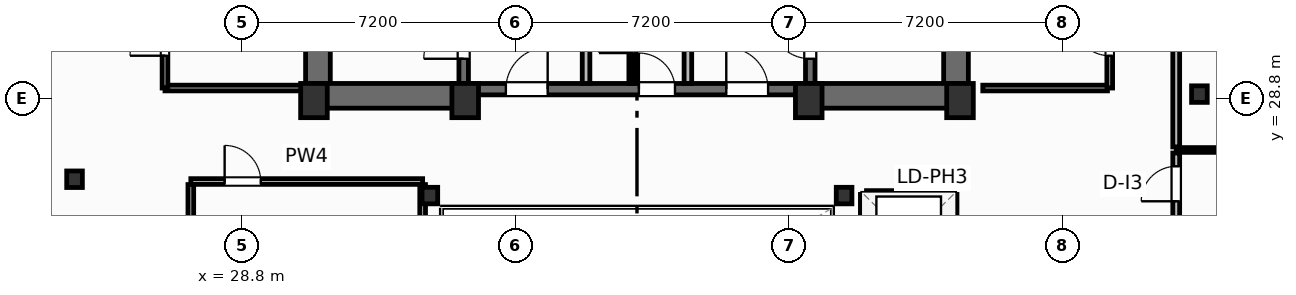
"""IFC4 building model, lengths in metres.
Left out: names, types, materials, properties, quantities, classifications, styles, units other than length and angle.
Written with IfcOpenShell. Run it as: python <this file> out.ifc"""

import sys

from ifc_helpers import new_model, si_unit, direction, frame, frame_2d, origin, origin_2d, place, context, subcontext, project, spatial, rectangle, i_section, extrude, element, fill, save


model = new_model("IFC4")
c1 = context("Model", 3, precision=1e-05, world=origin(), true_north=direction((0.0, 1.0)))
c2 = subcontext(c1, "Body", "Model", "MODEL_VIEW")
j1 = project(units=[si_unit("LENGTHUNIT", "METRE"), si_unit("PLANEANGLEUNIT", "RADIAN")], contexts=[c1])
p1 = place(None, origin())
s1 = spatial("IfcSite", under=j1, at=p1, CompositionType="ELEMENT")
p2 = place(p1, origin())
s2 = spatial("IfcBuilding", under=s1, at=p2, CompositionType="ELEMENT")
p3 = place(p2, frame((0.0, 0.0, 249.7)))
s3 = spatial("IfcBuildingStorey", under=s2, at=p3, CompositionType="ELEMENT", Elevation=249.7)
for number, where, z_axis, x_axis in (
    (1, (30.7, 28.75, 0.0), (0.0, 0.0, 1.0), (1.0, 0.0, 0.0)),
    (2, (34.68, 28.75, 0.0), (0.0, 0.0, 1.0), (1.0, 0.0, 0.0)),
    (3, (43.72, 28.75, 0.0), (0.0, 0.0, 1.0), (1.0, 0.0, 0.0)),
    (4, (47.7, 28.75, 0.0), (0.0, 0.0, 1.0), (1.0, 0.0, 0.0)),
):
    element("IfcColumn", number, at=place(p3, frame(where, z_axis=z_axis, x_axis=x_axis)), inside=s3, PredefinedType="COLUMN", context=c2, shape_type="SweptSolid", body=[
        extrude(rectangle(XDim=0.7, YDim=0.9, at=origin_2d()), origin(), (0.0, 0.0, 1.0), 3.7),
    ])
for number, where, z_axis, x_axis in (
    (5, (33.75, 26.25, 0.0), (0.0, 0.0, 1.0), (1.0, 0.0, 0.0)),
    (6, (44.65, 26.25, 0.0), (0.0, 0.0, 1.0), (1.0, 0.0, 0.0)),
    (7, (24.4, 26.68, 0.0), (0.0, 0.0, 1.0), (1.0, 0.0, 0.0)),
    (8, (54.0, 28.92, 0.0), (0.0, 0.0, 1.0), (1.0, 0.0, 0.0)),
):
    element("IfcColumn", number, at=place(p3, frame(where, z_axis=z_axis, x_axis=x_axis)), inside=s3, PredefinedType="COLUMN", context=c2, shape_type="SweptSolid", body=[
        extrude(i_section(OverallWidth=0.412, OverallDepth=0.435, WebThickness=0.036, FlangeThickness=0.057, FilletRadius=0.025, at=origin_2d()), origin(), (0.0, 0.0, 1.0), 3.7),
    ])
for number, where, z_axis, x_axis in (
    (9, (30.805, 29.2, 0.0), (0.0, 0.0, 1.0), (0.0, 1.0, 0.0)),
    (10, (47.595, 29.2, 0.0), (0.0, 0.0, 1.0), (0.0, 1.0, 0.0)),
):
    element("IfcWall", number, at=place(p3, frame(where, z_axis=z_axis, x_axis=x_axis)), inside=s3, PredefinedType="SHEAR", context=c2, shape_type="SweptSolid", body=[
        extrude(rectangle(XDim=9.22, YDim=0.65, at=frame_2d((4.61, 0.0))), origin(), (0.0, 0.0, 1.0), 3.38),
    ])
p4 = place(p3, frame((30.48, 28.875, 0.0), z_axis=(0.0, 0.0, 1.0), x_axis=(1.0, 0.0, 0.0)))
e11 = element("IfcWall", 11, at=p4, inside=s3, PredefinedType="SHEAR", context=c2, shape_type="SweptSolid", body=[
    extrude(rectangle(XDim=4.32, YDim=0.65, at=frame_2d((2.16, 0.0))), origin(), (0.0, 0.0, 1.0), 3.38),
])
p5 = place(p3, frame((43.6, 28.875, 0.0), z_axis=(0.0, 0.0, 1.0), x_axis=(1.0, 0.0, 0.0)))
e12 = element("IfcWall", 12, at=p5, inside=s3, PredefinedType="SHEAR", context=c2, shape_type="SweptSolid", body=[
    extrude(rectangle(XDim=4.32, YDim=0.65, at=frame_2d((2.16, 0.0))), origin(), (0.0, 0.0, 1.0), 3.38),
])
p6 = place(p3, frame((34.8, 29.05, 0.0), z_axis=(0.0, 0.0, 1.0), x_axis=(1.0, 0.0, 0.0)))
e13 = element("IfcWall", 13, at=p6, inside=s3, PredefinedType="SHEAR", context=c2, shape_type="SweptSolid", body=[
    extrude(rectangle(XDim=8.8, YDim=0.3, at=frame_2d((4.4, 0.0))), origin(), (0.0, 0.0, 1.0), 3.38),
])
p7 = place(p6, frame((0.95, 0.0, 0.0)))
e14 = element("IfcOpeningElement", 14, at=p7, cuts=e13, PredefinedType="OPENING", context=c2, shape_type="SweptSolid", body=[
    extrude(rectangle(XDim=1.1, YDim=2.15, at=frame_2d((0.55, 1.075))), frame((0.0, 0.16, 0.0), z_axis=(0.0, -1.0, 0.0), x_axis=(1.0, 0.0, 0.0)), (0.0, 0.0, 1.0), 0.32),
])
p8 = place(p6, frame((6.75, 0.0, 0.0)))
e15 = element("IfcOpeningElement", 15, at=p8, cuts=e13, PredefinedType="OPENING", context=c2, shape_type="SweptSolid", body=[
    extrude(rectangle(XDim=1.1, YDim=2.15, at=frame_2d((0.55, 1.075))), frame((0.0, 0.16, 0.0), z_axis=(0.0, -1.0, 0.0), x_axis=(1.0, 0.0, 0.0)), (0.0, 0.0, 1.0), 0.32),
])
p9 = place(p6, frame((4.45, 0.0, 0.0)))
e16 = element("IfcOpeningElement", 16, at=p9, cuts=e13, PredefinedType="OPENING", context=c2, shape_type="SweptSolid", body=[
    extrude(rectangle(XDim=0.95, YDim=2.15, at=frame_2d((0.475, 1.075))), frame((0.0, 0.16, 0.0), z_axis=(0.0, -1.0, 0.0), x_axis=(1.0, 0.0, 0.0)), (0.0, 0.0, 1.0), 0.32),
])
p10 = place(p3, frame((34.64, 29.2, 0.0), z_axis=(0.0, 0.0, 1.0), x_axis=(0.0, 1.0, 0.0)))
e17 = element("IfcWall", 17, at=p10, inside=s3, PredefinedType="SHEAR", context=c2, shape_type="SweptSolid", body=[
    extrude(rectangle(XDim=9.22, YDim=0.25, at=frame_2d((4.61, 0.0))), origin(), (0.0, 0.0, 1.0), 3.38),
])
p11 = place(p10, frame((0.65, 0.0, 0.0)))
e18 = element("IfcOpeningElement", 18, at=p11, cuts=e17, PredefinedType="OPENING", context=c2, shape_type="SweptSolid", body=[
    extrude(rectangle(XDim=1.05, YDim=2.15, at=frame_2d((0.525, 1.075))), frame((0.0, 0.135, 0.0), z_axis=(0.0, -1.0, 0.0), x_axis=(1.0, 0.0, 0.0)), (0.0, 0.0, 1.0), 0.27),
])
p12 = place(p3, frame((43.76, 29.2, 0.0), z_axis=(0.0, 0.0, 1.0), x_axis=(0.0, 1.0, 0.0)))
e19 = element("IfcWall", 19, at=p12, inside=s3, PredefinedType="SHEAR", context=c2, shape_type="SweptSolid", body=[
    extrude(rectangle(XDim=9.22, YDim=0.25, at=frame_2d((4.61, 0.0))), origin(), (0.0, 0.0, 1.0), 3.38),
])
p13 = place(p12, frame((0.65, 0.0, 0.0)))
e20 = element("IfcOpeningElement", 20, at=p13, cuts=e19, PredefinedType="OPENING", context=c2, shape_type="SweptSolid", body=[
    extrude(rectangle(XDim=1.05, YDim=2.15, at=frame_2d((0.525, 1.075))), frame((0.0, 0.135, 0.0), z_axis=(0.0, -1.0, 0.0), x_axis=(1.0, 0.0, 0.0)), (0.0, 0.0, 1.0), 0.27),
])
p14 = place(p3, frame((53.39, 19.3, 0.0), z_axis=(0.0, 0.0, 1.0), x_axis=(0.0, 1.0, 0.0)))
e21 = element("IfcWall", 21, at=p14, inside=s3, PredefinedType="PARTITIONING", context=c2, shape_type="SweptSolid", body=[
    extrude(rectangle(XDim=8.07, YDim=0.18, at=frame_2d((4.035, 0.0))), origin(), (0.0, 0.0, 1.0), 3.38),
])
p15 = place(p14, frame((6.8, 0.0, 0.0)))
e22 = element("IfcOpeningElement", 22, at=p15, cuts=e21, PredefinedType="OPENING", context=c2, shape_type="SweptSolid", body=[
    extrude(rectangle(XDim=0.92, YDim=2.05, at=frame_2d((0.46, 1.025))), frame((0.0, 0.1, 0.0), z_axis=(0.0, -1.0, 0.0), x_axis=(1.0, 0.0, 0.0)), (0.0, 0.0, 1.0), 0.2),
])
p16 = place(p3, frame((53.39, 27.53, 0.0), z_axis=(0.0, 0.0, 1.0), x_axis=(0.0, 1.0, 0.0)))
e23 = element("IfcWall", 23, at=p16, inside=s3, PredefinedType="PARTITIONING", context=c2, shape_type="SweptSolid", body=[
    extrude(rectangle(XDim=11.67, YDim=0.18, at=frame_2d((5.835, 0.0))), origin(), (0.0, 0.0, 1.0), 3.38),
])
p17 = place(p16, frame((5.8, 0.0, 0.0)))
e24 = element("IfcOpeningElement", 24, at=p17, cuts=e23, PredefinedType="OPENING", context=c2, shape_type="SweptSolid", body=[
    extrude(rectangle(XDim=0.92, YDim=2.05, at=frame_2d((0.46, 1.025))), frame((0.0, 0.1, 0.0), z_axis=(0.0, -1.0, 0.0), x_axis=(1.0, 0.0, 0.0)), (0.0, 0.0, 1.0), 0.2),
])
p18 = place(p3, frame((53.39, 27.45, 0.0), z_axis=(0.0, 0.0, 1.0), x_axis=(1.0, 0.0, 0.0)))
e25 = element("IfcWall", 25, at=p18, inside=s3, PredefinedType="PARTITIONING", context=c2, shape_type="SweptSolid", body=[
    extrude(rectangle(XDim=20.199, YDim=0.125, at=frame_2d((10.1, 0.0))), origin(), (0.0, 0.0, 1.0), 1.165),
])
for number, where, z_axis, x_axis in (
    (26, (37.86, 29.2, 0.0), (0.0, 0.0, 1.0), (0.0, 1.0, 0.0)),
    (27, (40.54, 29.2, 0.0), (0.0, 0.0, 1.0), (0.0, 1.0, 0.0)),
):
    element("IfcWall", number, at=place(p3, frame(where, z_axis=z_axis, x_axis=x_axis)), inside=s3, PredefinedType="PARTITIONING", context=c2, shape_type="SweptSolid", body=[
        extrude(rectangle(XDim=5.18, YDim=0.2, at=frame_2d((2.59, 0.0))), origin(), (0.0, 0.0, 1.0), 3.38),
    ])
p19 = place(p3, frame((39.05, 29.2, 0.0), z_axis=(0.0, 0.0, 1.0), x_axis=(0.0, 1.0, 0.0)))
e28 = element("IfcWall", 28, at=p19, inside=s3, PredefinedType="PARTITIONING", context=c2, shape_type="SweptSolid", body=[
    extrude(rectangle(XDim=5.22, YDim=0.125, at=frame_2d((2.61, 0.0))), origin(), (0.0, 0.0, 1.0), 3.38),
])
p20 = place(p19, frame((0.8, 0.0, 0.0)))
e29 = element("IfcOpeningElement", 29, at=p20, cuts=e28, PredefinedType="OPENING", context=c2, shape_type="SweptSolid", body=[
    extrude(rectangle(XDim=0.85, YDim=2.05, at=frame_2d((0.425, 1.025))), frame((0.0, 0.073, 0.0), z_axis=(0.0, -1.0, 0.0), x_axis=(1.0, 0.0, 0.0)), (0.0, 0.0, 1.0), 0.145),
])
p21 = place(p19, frame((3.4, 0.0, 0.0)))
e30 = element("IfcOpeningElement", 30, at=p21, cuts=e28, PredefinedType="OPENING", context=c2, shape_type="SweptSolid", body=[
    extrude(rectangle(XDim=0.85, YDim=2.05, at=frame_2d((0.425, 1.025))), frame((0.0, 0.073, 0.0), z_axis=(0.0, -1.0, 0.0), x_axis=(1.0, 0.0, 0.0)), (0.0, 0.0, 1.0), 0.145),
])
p22 = place(p3, frame((27.46, 26.62, 0.0), z_axis=(0.0, 0.0, 1.0), x_axis=(1.0, 0.0, 0.0)))
e31 = element("IfcWall", 31, at=p22, inside=s3, PredefinedType="PARTITIONING", context=c2, shape_type="SweptSolid", body=[
    extrude(rectangle(XDim=6.1, YDim=0.15, at=frame_2d((3.05, 0.0))), origin(), (0.0, 0.0, 1.0), 2.592),
])
p23 = place(p22, frame((0.89, 0.0, 0.0)))
e32 = element("IfcOpeningElement", 32, at=p23, cuts=e31, PredefinedType="OPENING", context=c2, shape_type="SweptSolid", body=[
    extrude(rectangle(XDim=0.95, YDim=2.05, at=frame_2d((0.475, 1.025))), frame((0.0, 0.085, 0.0), z_axis=(0.0, -1.0, 0.0), x_axis=(1.0, 0.0, 0.0)), (0.0, 0.0, 1.0), 0.17),
])
p24 = place(p3, frame((27.46, 19.38, 0.0), z_axis=(0.0, 0.0, 1.0), x_axis=(0.0, 1.0, 0.0)))
e33 = element("IfcWall", 33, at=p24, inside=s3, PredefinedType="PARTITIONING", context=c2, shape_type="SweptSolid", body=[
    extrude(rectangle(XDim=7.16, YDim=0.15, at=frame_2d((3.58, 0.0))), origin(), (0.0, 0.0, 1.0), 3.38),
])
p25 = place(p24, frame((1.1, 0.0, 0.0)))
e34 = element("IfcOpeningElement", 34, at=p25, cuts=e33, PredefinedType="OPENING", context=c2, shape_type="SweptSolid", body=[
    extrude(rectangle(XDim=0.9, YDim=2.05, at=frame_2d((0.45, 1.025))), frame((0.0, 0.085, 0.0), z_axis=(0.0, -1.0, 0.0), x_axis=(1.0, 0.0, 0.0)), (0.0, 0.0, 1.0), 0.17),
])
p26 = place(p3, frame((33.56, 19.38, 0.0), z_axis=(0.0, 0.0, 1.0), x_axis=(0.0, 1.0, 0.0)))
e35 = element("IfcWall", 35, at=p26, inside=s3, PredefinedType="PARTITIONING", context=c2, shape_type="SweptSolid", body=[
    extrude(rectangle(XDim=7.16, YDim=0.15, at=frame_2d((3.58, 0.0))), origin(), (0.0, 0.0, 1.0), 2.754),
])
p27 = place(p3, frame((26.78, 29.08, 0.0), z_axis=(0.0, 0.0, 1.0), x_axis=(1.0, 0.0, 0.0)))
e36 = element("IfcWall", 36, at=p27, inside=s3, PredefinedType="PARTITIONING", context=c2, shape_type="SweptSolid", body=[
    extrude(rectangle(XDim=3.7, YDim=0.15, at=frame_2d((1.85, 0.0))), origin(), (0.0, 0.0, 1.0), 3.38),
])
p28 = place(p3, frame((26.78, 29.08, 0.0), z_axis=(0.0, 0.0, 1.0), x_axis=(0.0, 1.0, 0.0)))
e37 = element("IfcWall", 37, at=p28, inside=s3, PredefinedType="PARTITIONING", context=c2, shape_type="SweptSolid", body=[
    extrude(rectangle(XDim=5.87, YDim=0.15, at=frame_2d((2.935, 0.0))), origin(), (0.0, 0.0, 1.0), 3.38),
])
p29 = place(p28, frame((0.85, 0.0, 0.0)))
e38 = element("IfcOpeningElement", 38, at=p29, cuts=e37, PredefinedType="OPENING", context=c2, shape_type="SweptSolid", body=[
    extrude(rectangle(XDim=0.92, YDim=2.05, at=frame_2d((0.46, 1.025))), frame((0.0, 0.085, 0.0), z_axis=(0.0, -1.0, 0.0), x_axis=(1.0, 0.0, 0.0)), (0.0, 0.0, 1.0), 0.17),
])
p30 = place(p28, frame((3.45, 0.0, 0.0)))
e39 = element("IfcOpeningElement", 39, at=p30, cuts=e37, PredefinedType="OPENING", context=c2, shape_type="SweptSolid", body=[
    extrude(rectangle(XDim=0.85, YDim=2.05, at=frame_2d((0.425, 1.025))), frame((0.0, 0.085, 0.0), z_axis=(0.0, -1.0, 0.0), x_axis=(1.0, 0.0, 0.0)), (0.0, 0.0, 1.0), 0.17),
])
p31 = place(p3, frame((48.3, 29.08, 0.0), z_axis=(0.0, 0.0, 1.0), x_axis=(1.0, 0.0, 0.0)))
e40 = element("IfcWall", 40, at=p31, inside=s3, PredefinedType="PARTITIONING", context=c2, shape_type="SweptSolid", body=[
    extrude(rectangle(XDim=3.28, YDim=0.15, at=frame_2d((1.64, 0.0))), origin(), (0.0, 0.0, 1.0), 2.592),
])
p32 = place(p3, frame((51.64, 29.08, 0.0), z_axis=(0.0, 0.0, 1.0), x_axis=(0.0, 1.0, 0.0)))
e41 = element("IfcWall", 41, at=p32, inside=s3, PredefinedType="PARTITIONING", context=c2, shape_type="SweptSolid", body=[
    extrude(rectangle(XDim=6.88, YDim=0.15, at=frame_2d((3.44, 0.0))), origin(), (0.0, 0.0, 1.0), 3.38),
])
p33 = place(p32, frame((0.85, 0.0, 0.0)))
e42 = element("IfcOpeningElement", 42, at=p33, cuts=e41, PredefinedType="OPENING", context=c2, shape_type="SweptSolid", body=[
    extrude(rectangle(XDim=0.95, YDim=2.05, at=frame_2d((0.475, 1.025))), frame((0.0, 0.085, 0.0), z_axis=(0.0, -1.0, 0.0), x_axis=(1.0, 0.0, 0.0)), (0.0, 0.0, 1.0), 0.17),
])
p34 = place(p3, frame((45.24, 26.28, 0.0), z_axis=(0.0, 0.0, 1.0), x_axis=(1.0, 0.0, 0.0)))
e43 = element("IfcWall", 43, at=p34, inside=s3, PredefinedType="PARTITIONING", context=c2, shape_type="SweptSolid", body=[
    extrude(rectangle(XDim=2.22, YDim=0.2, at=frame_2d((1.11, 0.0))), origin(), (0.0, 0.0, 1.0), 3.38),
])
p35 = place(p3, frame((45.18, 19.38, 0.0), z_axis=(0.0, 0.0, 1.0), x_axis=(0.0, 1.0, 0.0)))
e44 = element("IfcWall", 44, at=p35, inside=s3, PredefinedType="PARTITIONING", context=c2, shape_type="SweptSolid", body=[
    extrude(rectangle(XDim=6.9, YDim=0.2, at=frame_2d((3.45, 0.0))), origin(), (0.0, 0.0, 1.0), 3.38),
])
p36 = place(p3, frame((47.52, 19.38, 0.0), z_axis=(0.0, 0.0, 1.0), x_axis=(0.0, 1.0, 0.0)))
e45 = element("IfcWall", 45, at=p36, inside=s3, PredefinedType="PARTITIONING", context=c2, shape_type="SweptSolid", body=[
    extrude(rectangle(XDim=6.9, YDim=0.2, at=frame_2d((3.45, 0.0))), origin(), (0.0, 0.0, 1.0), 3.38),
])
p37 = place(p36, frame((0.59, 0.0, 0.0)))
e46 = element("IfcOpeningElement", 46, at=p37, cuts=e45, PredefinedType="OPENING", context=c2, shape_type="SweptSolid", body=[
    extrude(rectangle(XDim=1.1, YDim=2.15, at=frame_2d((0.55, 1.075))), frame((0.0, 0.11, 0.0), z_axis=(0.0, -1.0, 0.0), x_axis=(1.0, 0.0, 0.0)), (0.0, 0.0, 1.0), 0.22),
])
p38 = place(p36, frame((2.89, 0.0, 0.0)))
e47 = element("IfcOpeningElement", 47, at=p38, cuts=e45, PredefinedType="OPENING", context=c2, shape_type="SweptSolid", body=[
    extrude(rectangle(XDim=1.1, YDim=2.15, at=frame_2d((0.55, 1.075))), frame((0.0, 0.11, 0.0), z_axis=(0.0, -1.0, 0.0), x_axis=(1.0, 0.0, 0.0)), (0.0, 0.0, 1.0), 0.22),
])
p39 = place(p36, frame((5.19, 0.0, 0.0)))
e48 = element("IfcOpeningElement", 48, at=p39, cuts=e45, PredefinedType="OPENING", context=c2, shape_type="SweptSolid", body=[
    extrude(rectangle(XDim=1.1, YDim=2.15, at=frame_2d((0.55, 1.075))), frame((0.0, 0.11, 0.0), z_axis=(0.0, -1.0, 0.0), x_axis=(1.0, 0.0, 0.0)), (0.0, 0.0, 1.0), 0.22),
])
p40 = place(p15, origin())
e49 = element("IfcDoor", 49, at=p40, inside=s3, OperationType="SINGLE_SWING_LEFT", PredefinedType="DOOR", context=c2, shape_type="SweptSolid", body=[
    extrude(rectangle(XDim=0.92, YDim=2.05, at=frame_2d((0.46, 1.025))), frame((0.0, 0.025, 0.0), z_axis=(0.0, -1.0, 0.0), x_axis=(1.0, 0.0, 0.0)), (0.0, 0.0, 1.0), 0.05),
])
fill(e22, e49)
p41 = place(p11, origin())
e50 = element("IfcDoor", 50, at=p41, inside=s3, OperationType="SINGLE_SWING_LEFT", PredefinedType="DOOR", context=c2, shape_type="SweptSolid", body=[
    extrude(rectangle(XDim=1.05, YDim=2.15, at=frame_2d((0.525, 1.075))), frame((0.0, 0.025, 0.0), z_axis=(0.0, -1.0, 0.0), x_axis=(1.0, 0.0, 0.0)), (0.0, 0.0, 1.0), 0.05),
])
fill(e18, e50)
p42 = place(p13, origin())
e51 = element("IfcDoor", 51, at=p42, inside=s3, OperationType="SINGLE_SWING_RIGHT", PredefinedType="DOOR", context=c2, shape_type="SweptSolid", body=[
    extrude(rectangle(XDim=1.05, YDim=2.15, at=frame_2d((0.525, 1.075))), frame((0.0, 0.025, 0.0), z_axis=(0.0, -1.0, 0.0), x_axis=(1.0, 0.0, 0.0)), (0.0, 0.0, 1.0), 0.05),
])
fill(e20, e51)
p43 = place(p7, origin())
e52 = element("IfcDoor", 52, at=p43, inside=s3, OperationType="SINGLE_SWING_RIGHT", PredefinedType="DOOR", context=c2, shape_type="SweptSolid", body=[
    extrude(rectangle(XDim=1.1, YDim=2.15, at=frame_2d((0.55, 1.075))), frame((0.0, 0.025, 0.0), z_axis=(0.0, -1.0, 0.0), x_axis=(1.0, 0.0, 0.0)), (0.0, 0.0, 1.0), 0.05),
])
fill(e14, e52)
p44 = place(p8, origin())
e53 = element("IfcDoor", 53, at=p44, inside=s3, OperationType="SINGLE_SWING_LEFT", PredefinedType="DOOR", context=c2, shape_type="SweptSolid", body=[
    extrude(rectangle(XDim=1.1, YDim=2.15, at=frame_2d((0.55, 1.075))), frame((0.0, 0.025, 0.0), z_axis=(0.0, -1.0, 0.0), x_axis=(1.0, 0.0, 0.0)), (0.0, 0.0, 1.0), 0.05),
])
fill(e15, e53)
p45 = place(p20, origin())
e54 = element("IfcDoor", 54, at=p45, inside=s3, OperationType="SINGLE_SWING_LEFT", PredefinedType="DOOR", context=c2, shape_type="SweptSolid", body=[
    extrude(rectangle(XDim=0.85, YDim=2.05, at=frame_2d((0.425, 1.025))), frame((0.0, 0.025, 0.0), z_axis=(0.0, -1.0, 0.0), x_axis=(1.0, 0.0, 0.0)), (0.0, 0.0, 1.0), 0.05),
])
fill(e29, e54)
p46 = place(p9, origin())
e55 = element("IfcDoor", 55, at=p46, inside=s3, OperationType="SINGLE_SWING_LEFT", PredefinedType="DOOR", context=c2, shape_type="SweptSolid", body=[
    extrude(rectangle(XDim=0.95, YDim=2.15, at=frame_2d((0.475, 1.075))), frame((0.0, 0.025, 0.0), z_axis=(0.0, -1.0, 0.0), x_axis=(1.0, 0.0, 0.0)), (0.0, 0.0, 1.0), 0.05),
])
fill(e16, e55)
p47 = place(p23, origin())
e56 = element("IfcDoor", 56, at=p47, inside=s3, OperationType="SINGLE_SWING_LEFT", PredefinedType="DOOR", context=c2, shape_type="SweptSolid", body=[
    extrude(rectangle(XDim=0.95, YDim=2.05, at=frame_2d((0.475, 1.025))), frame((0.0, 0.025, 0.0), z_axis=(0.0, -1.0, 0.0), x_axis=(1.0, 0.0, 0.0)), (0.0, 0.0, 1.0), 0.05),
])
fill(e32, e56)
p48 = place(p29, origin())
e57 = element("IfcDoor", 57, at=p48, inside=s3, OperationType="SINGLE_SWING_LEFT", PredefinedType="DOOR", context=c2, shape_type="SweptSolid", body=[
    extrude(rectangle(XDim=0.92, YDim=2.05, at=frame_2d((0.46, 1.025))), frame((0.0, 0.025, 0.0), z_axis=(0.0, -1.0, 0.0), x_axis=(1.0, 0.0, 0.0)), (0.0, 0.0, 1.0), 0.05),
])
fill(e38, e57)
p49 = place(p33, origin())
e58 = element("IfcDoor", 58, at=p49, inside=s3, OperationType="SINGLE_SWING_RIGHT", PredefinedType="DOOR", context=c2, shape_type="SweptSolid", body=[
    extrude(rectangle(XDim=0.95, YDim=2.05, at=frame_2d((0.475, 1.025))), frame((0.0, 0.025, 0.0), z_axis=(0.0, -1.0, 0.0), x_axis=(1.0, 0.0, 0.0)), (0.0, 0.0, 1.0), 0.05),
])
fill(e42, e58)
save(model, sys.argv[1])
